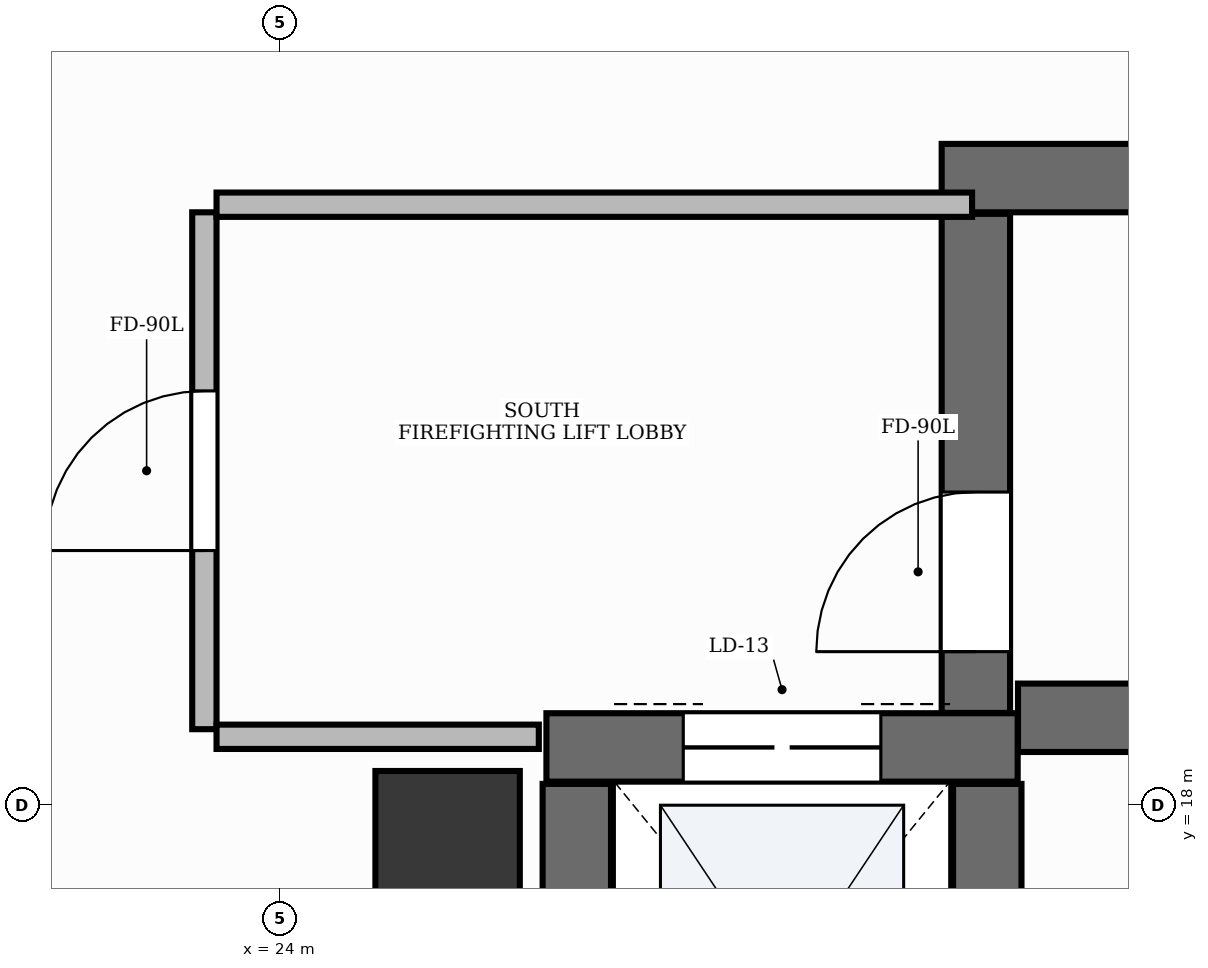
"""IFC4 building model, lengths in metres.
Left out: names, types, materials, properties, quantities, classifications, styles, units other than length and angle.
Written with IfcOpenShell. Run it as: python <this file> out.ifc"""

import sys

from ifc_helpers import new_model, si_unit, direction, frame, frame_2d, origin, origin_2d, place, context, subcontext, project, spatial, rectangle, extrude, element, fill, save


model = new_model("IFC4")
c1 = context("Model", 3, precision=1e-05, world=origin(), true_north=direction((0.0, 1.0)))
c2 = subcontext(c1, "Body", "Model", "MODEL_VIEW")
j1 = project(units=[si_unit("LENGTHUNIT", "METRE"), si_unit("PLANEANGLEUNIT", "RADIAN")], contexts=[c1])
p1 = place(None, origin())
s1 = spatial("IfcSite", under=j1, at=p1, CompositionType="ELEMENT")
p2 = place(p1, origin())
s2 = spatial("IfcBuilding", under=s1, at=p2, CompositionType="ELEMENT")
p3 = place(p2, frame((0.0, 0.0, 38.4)))
s3 = spatial("IfcBuildingStorey", under=s2, at=p3, CompositionType="ELEMENT", Elevation=38.4)
p4 = place(p3, frame((28.852, 18.575, 0.0), z_axis=(0.0, 0.0, 1.0), x_axis=(1.0, 0.0, 0.0)))
e1 = element("IfcWall", 1, at=p4, inside=s3, PredefinedType="SHEAR", context=c2, shape_type="SweptSolid", body=[
    extrude(rectangle(XDim=8.248, YDim=0.45, at=frame_2d((4.124, 0.0))), origin(), (0.0, 0.0, 1.0), 3.9),
])
p5 = place(p3, frame((28.35, 22.125, 0.0), z_axis=(0.0, 0.0, 1.0), x_axis=(1.0, 0.0, 0.0)))
e2 = element("IfcWall", 2, at=p5, inside=s3, PredefinedType="SHEAR", context=c2, shape_type="SweptSolid", body=[
    extrude(rectangle(XDim=8.75, YDim=0.45, at=frame_2d((4.375, 0.0))), origin(), (0.0, 0.0, 1.0), 3.9),
])
p6 = place(p3, frame((28.575, 18.607, 0.0), z_axis=(0.0, 0.0, 1.0), x_axis=(0.0, 1.0, 0.0)))
e3 = element("IfcWall", 3, at=p6, inside=s3, PredefinedType="SHEAR", context=c2, shape_type="SweptSolid", body=[
    extrude(rectangle(XDim=3.283, YDim=0.45, at=frame_2d((1.642, 0.0))), origin(), (0.0, 0.0, 1.0), 3.9),
])
p7 = place(p6, frame((0.403, 0.0, 0.0)))
e4 = element("IfcOpeningElement", 4, at=p7, cuts=e3, PredefinedType="OPENING", context=c2, shape_type="SweptSolid", body=[
    extrude(rectangle(XDim=1.05, YDim=2.15, at=frame_2d((0.525, 1.075))), frame((0.0, 0.24, 0.0), z_axis=(0.0, -1.0, 0.0), x_axis=(1.0, 0.0, 0.0)), (0.0, 0.0, 1.0), 0.48),
])
p8 = place(p3, frame((25.75, 18.38, 0.0), z_axis=(0.0, 0.0, 1.0), x_axis=(1.0, 0.0, 0.0)))
e5 = element("IfcWall", 5, at=p8, inside=s3, PredefinedType="SHEAR", context=c2, shape_type="SweptSolid", body=[
    extrude(rectangle(XDim=3.1, YDim=0.45, at=frame_2d((1.55, 0.0))), origin(), (0.0, 0.0, 1.0), 3.9),
])
p9 = place(p8, frame((0.9, 0.0, 0.0)))
e6 = element("IfcOpeningElement", 6, at=p9, cuts=e5, PredefinedType="OPENING", context=c2, shape_type="SweptSolid", body=[
    extrude(rectangle(XDim=1.3, YDim=2.2, at=frame_2d((0.65, 1.1))), frame((0.0, 0.24, 0.0), z_axis=(0.0, -1.0, 0.0), x_axis=(1.0, 0.0, 0.0)), (0.0, 0.0, 1.0), 0.48),
])
for number, where, z_axis, x_axis in (
    (7, (25.95, 15.44, 0.0), (0.0, 0.0, 1.0), (0.0, 1.0, 0.0)),
    (8, (28.65, 15.44, 0.0), (0.0, 0.0, 1.0), (0.0, 1.0, 0.0)),
):
    element("IfcWall", number, at=place(p3, frame(where, z_axis=z_axis, x_axis=x_axis)), inside=s3, PredefinedType="SHEAR", context=c2, shape_type="SweptSolid", body=[
        extrude(rectangle(XDim=2.7, YDim=0.45, at=frame_2d((1.35, 0.0))), origin(), (0.0, 0.0, 1.0), 3.9),
    ])
p10 = place(p3, frame((25.1, 17.75, -0.0), z_axis=(0.0, 0.0, 1.0), x_axis=(1.0, 0.0, 0.0)))
e9 = element("IfcColumn", 9, at=p10, inside=s3, PredefinedType="PILASTER", context=c2, shape_type="SweptSolid", body=[
    extrude(rectangle(XDim=0.95, YDim=0.95, at=origin_2d()), origin(), (0.0, 0.0, 1.0), 3.901),
])
p11 = place(p3, frame((23.5, 18.5, 0.0), z_axis=(0.0, 0.0, 1.0), x_axis=(0.0, 1.0, 0.0)))
e10 = element("IfcWall", 10, at=p11, inside=s3, PredefinedType="PARTITIONING", context=c2, shape_type="SweptSolid", body=[
    extrude(rectangle(XDim=3.4, YDim=0.16, at=frame_2d((1.7, 0.0))), origin(), (0.0, 0.0, 1.0), 2.91),
])
p12 = place(p11, frame((1.175, 0.0, 0.0)))
e11 = element("IfcOpeningElement", 11, at=p12, cuts=e10, PredefinedType="OPENING", context=c2, shape_type="SweptSolid", body=[
    extrude(rectangle(XDim=1.05, YDim=2.15, at=frame_2d((0.525, 1.075))), frame((0.0, 0.095, 0.0), z_axis=(0.0, -1.0, 0.0), x_axis=(1.0, 0.0, 0.0)), (0.0, 0.0, 1.0), 0.19),
])
p13 = place(p3, frame((23.58, 21.95, 0.0), z_axis=(0.0, 0.0, 1.0), x_axis=(1.0, 0.0, 0.0)))
e12 = element("IfcWall", 12, at=p13, inside=s3, PredefinedType="PARTITIONING", context=c2, shape_type="SweptSolid", body=[
    extrude(rectangle(XDim=4.97, YDim=0.16, at=frame_2d((2.485, 0.0))), origin(), (0.0, 0.0, 1.0), 2.91),
])
p14 = place(p3, frame((23.58, 18.45, 0.0), z_axis=(0.0, 0.0, 1.0), x_axis=(1.0, 0.0, 0.0)))
e13 = element("IfcWall", 13, at=p14, inside=s3, PredefinedType="PARTITIONING", context=c2, shape_type="SweptSolid", body=[
    extrude(rectangle(XDim=2.12, YDim=0.16, at=frame_2d((1.06, 0.0))), origin(), (0.0, 0.0, 1.0), 2.91),
])
p15 = place(p7, origin())
e14 = element("IfcDoor", 14, at=p15, inside=s3, OperationType="SINGLE_SWING_LEFT", PredefinedType="DOOR", context=c2, shape_type="SweptSolid", body=[
    extrude(rectangle(XDim=1.05, YDim=2.15, at=frame_2d((0.525, 1.075))), frame((0.0, 0.025, 0.0), z_axis=(0.0, -1.0, 0.0), x_axis=(1.0, 0.0, 0.0)), (0.0, 0.0, 1.0), 0.05),
])
fill(e4, e14)
p16 = place(p9, origin())
e15 = element("IfcDoor", 15, at=p16, inside=s3, OperationType="DOUBLE_DOOR_SLIDING", PredefinedType="DOOR", context=c2, shape_type="SweptSolid", body=[
    extrude(rectangle(XDim=1.3, YDim=2.2, at=frame_2d((0.65, 1.1))), frame((0.0, 0.025, 0.0), z_axis=(0.0, -1.0, 0.0), x_axis=(1.0, 0.0, 0.0)), (0.0, 0.0, 1.0), 0.05),
])
fill(e6, e15)
p17 = place(p12, origin())
e16 = element("IfcDoor", 16, at=p17, inside=s3, OperationType="SINGLE_SWING_LEFT", PredefinedType="DOOR", context=c2, shape_type="SweptSolid", body=[
    extrude(rectangle(XDim=1.05, YDim=2.15, at=frame_2d((0.525, 1.075))), frame((0.0, 0.025, 0.0), z_axis=(0.0, -1.0, 0.0), x_axis=(1.0, 0.0, 0.0)), (0.0, 0.0, 1.0), 0.05),
])
fill(e11, e16)
save(model, sys.argv[1])
